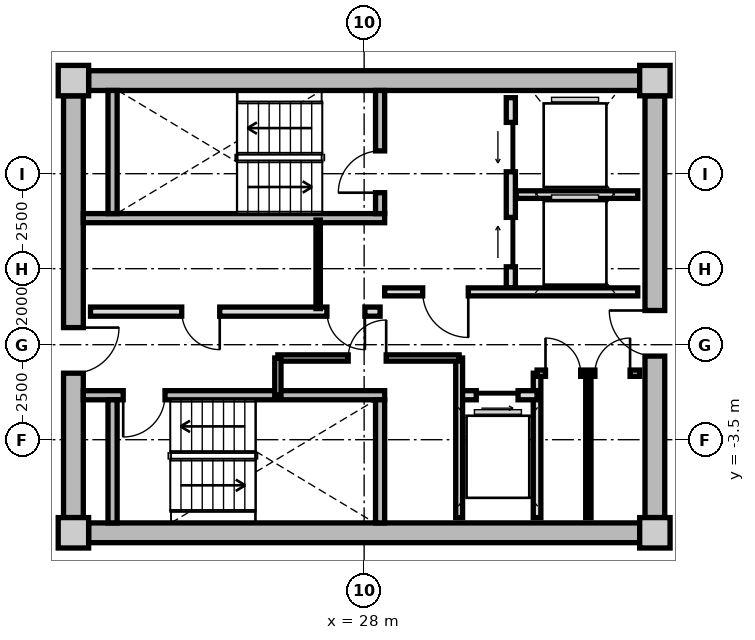
"""IFC4 building model, lengths in metres.
Left out: names, types, materials, properties, quantities, classifications, styles, units other than length and angle.
Written with IfcOpenShell. Run it as: python <this file> out.ifc"""

import sys

from ifc_helpers import new_model, si_unit, direction, frame, frame_2d, origin, origin_2d, place, context, subcontext, project, spatial, rectangle, extrude, source, transform, mapped, element, fill, save


model = new_model("IFC4")
c1 = context("Model", 3, precision=1e-05, world=origin(), true_north=direction((0.0, 1.0)))
c2 = subcontext(c1, "Body", "Model", "MODEL_VIEW")
j1 = project(units=[si_unit("LENGTHUNIT", "METRE"), si_unit("PLANEANGLEUNIT", "RADIAN")], contexts=[c1])
p1 = place(None, origin())
s1 = spatial("IfcSite", under=j1, at=p1, CompositionType="ELEMENT")
p2 = place(p1, origin())
s2 = spatial("IfcBuilding", under=s1, at=p2, CompositionType="ELEMENT")
p3 = place(p2, frame((0.0, 0.0, 223.05)))
s3 = spatial("IfcBuildingStorey", under=s2, at=p3, CompositionType="ELEMENT", Elevation=223.05)
m1 = source(origin(), c2, "Body", "SweptSolid", [
    extrude(rectangle(XDim=0.8, YDim=0.8, at=origin_2d()), origin(), (0.0, 0.0, 1.0), 3.05),
])
for number, where, z_axis, x_axis in (
    (1, (20.35, -5.95, 0.0), (0.0, 0.0, 1.0), (1.0, 0.0, 0.0)),
    (2, (35.65, -5.95, 0.0), (0.0, 0.0, 1.0), (1.0, 0.0, 0.0)),
    (3, (35.65, 5.95, 0.0), (0.0, 0.0, 1.0), (1.0, 0.0, 0.0)),
    (4, (20.35, 5.95, 0.0), (0.0, 0.0, 1.0), (1.0, 0.0, 0.0)),
):
    element("IfcColumn", number, at=place(p3, frame(where, z_axis=z_axis, x_axis=x_axis)), inside=s3, PredefinedType="COLUMN", context=c2, shape_type="MappedRepresentation", body=[
        mapped(m1, transform((0.0, 0.0, 0.0), x_axis=(1.0, 0.0, 0.0), y_axis=(0.0, 1.0, 0.0), z_axis=(0.0, 0.0, 1.0), scale=1.0)),
    ])
m2 = source(origin(), c2, "Body", "SweptSolid", [
    extrude(rectangle(XDim=14.5, YDim=0.52, at=frame_2d((7.25, 0.0))), origin(), (0.0, 0.0, 1.0), 2.76),
])
for number, where, z_axis, x_axis in (
    (5, (20.75, 5.95, 0.0), (0.0, 0.0, 1.0), (1.0, 0.0, 0.0)),
    (6, (35.25, -5.95, 0.0), (0.0, 0.0, 1.0), (-1.0, 0.0, 0.0)),
):
    element("IfcWall", number, at=place(p3, frame(where, z_axis=z_axis, x_axis=x_axis)), inside=s3, PredefinedType="SHEAR", context=c2, shape_type="MappedRepresentation", body=[
        mapped(m2, transform((0.0, 0.0, 0.0), x_axis=(1.0, 0.0, 0.0), y_axis=(0.0, 1.0, 0.0), z_axis=(0.0, 0.0, 1.0), scale=1.0)),
    ])
m3 = source(origin(), c2, "Body", "SweptSolid", [
    extrude(rectangle(XDim=11.1, YDim=0.52, at=frame_2d((5.55, 0.0))), origin(), (0.0, 0.0, 1.0), 2.76),
])
p4 = place(p3, frame((20.35, -5.55, 0.0), z_axis=(0.0, 0.0, 1.0), x_axis=(0.0, 1.0, 0.0)))
e7 = element("IfcWall", 7, at=p4, inside=s3, PredefinedType="SHEAR", context=c2, shape_type="MappedRepresentation", body=[
    mapped(m3, transform((0.0, 0.0, 0.0), x_axis=(1.0, 0.0, 0.0), y_axis=(0.0, 1.0, 0.0), z_axis=(0.0, 0.0, 1.0), scale=1.0)),
])
p5 = place(p4, frame((3.8, 0.0, 0.0)))
e8 = element("IfcOpeningElement", 8, at=p5, cuts=e7, PredefinedType="OPENING", context=c2, shape_type="SweptSolid", body=[
    extrude(rectangle(XDim=1.2, YDim=2.15, at=frame_2d((0.6, 1.075))), frame((0.0, 0.27, 0.0), z_axis=(0.0, -1.0, 0.0), x_axis=(1.0, 0.0, 0.0)), (0.0, 0.0, 1.0), 0.54),
])
p6 = place(p3, frame((35.65, 5.55, 0.0), z_axis=(0.0, 0.0, 1.0), x_axis=(0.0, -1.0, 0.0)))
e9 = element("IfcWall", 9, at=p6, inside=s3, PredefinedType="SHEAR", context=c2, shape_type="MappedRepresentation", body=[
    mapped(m3, transform((0.0, 0.0, 0.0), x_axis=(1.0, 0.0, 0.0), y_axis=(0.0, 1.0, 0.0), z_axis=(0.0, 0.0, 1.0), scale=1.0)),
])
p7 = place(p6, frame((5.65, 0.0, 0.0)))
e10 = element("IfcOpeningElement", 10, at=p7, cuts=e9, PredefinedType="OPENING", context=c2, shape_type="SweptSolid", body=[
    extrude(rectangle(XDim=1.2, YDim=2.15, at=frame_2d((0.6, 1.075))), frame((0.0, 0.27, 0.0), z_axis=(0.0, -1.0, 0.0), x_axis=(1.0, 0.0, 0.0)), (0.0, 0.0, 1.0), 0.54),
])
m4 = source(origin(), c2, "Body", "SweptSolid", [
    extrude(rectangle(XDim=7.93, YDim=0.24, at=frame_2d((3.965, 0.0))), origin(), (0.0, 0.0, 1.0), 2.76),
])
p8 = place(p3, frame((20.61, 2.33, 0.0), z_axis=(0.0, 0.0, 1.0), x_axis=(1.0, 0.0, 0.0)))
e11 = element("IfcWall", 11, at=p8, inside=s3, PredefinedType="PARTITIONING", context=c2, shape_type="MappedRepresentation", body=[
    mapped(m4, transform((0.0, 0.0, 0.0), x_axis=(1.0, 0.0, 0.0), y_axis=(0.0, 1.0, 0.0), z_axis=(0.0, 0.0, 1.0), scale=1.0)),
])
m5 = source(origin(), c2, "Body", "SweptSolid", [
    extrude(rectangle(XDim=3.24, YDim=0.24, at=frame_2d((1.62, 0.0))), origin(), (0.0, 0.0, 1.0), 2.76),
])
p9 = place(p3, frame((21.38, 2.45, 0.0), z_axis=(0.0, 0.0, 1.0), x_axis=(0.0, 1.0, 0.0)))
e12 = element("IfcWall", 12, at=p9, inside=s3, PredefinedType="PARTITIONING", context=c2, shape_type="MappedRepresentation", body=[
    mapped(m5, transform((0.0, 0.0, 0.0), x_axis=(1.0, 0.0, 0.0), y_axis=(0.0, 1.0, 0.0), z_axis=(0.0, 0.0, 1.0), scale=1.0)),
])
p10 = place(p3, frame((28.42, 2.45, 0.0), z_axis=(0.0, 0.0, 1.0), x_axis=(0.0, 1.0, 0.0)))
e13 = element("IfcWall", 13, at=p10, inside=s3, PredefinedType="PARTITIONING", context=c2, shape_type="MappedRepresentation", body=[
    mapped(m5, transform((0.0, 0.0, 0.0), x_axis=(1.0, 0.0, 0.0), y_axis=(0.0, 1.0, 0.0), z_axis=(0.0, 0.0, 1.0), scale=1.0)),
])
p11 = place(p10, frame((0.55, 0.0, 0.0)))
e14 = element("IfcOpeningElement", 14, at=p11, cuts=e13, PredefinedType="OPENING", context=c2, shape_type="SweptSolid", body=[
    extrude(rectangle(XDim=1.1, YDim=2.15, at=frame_2d((0.55, 1.075))), frame((0.0, 0.13, 0.0), z_axis=(0.0, -1.0, 0.0), x_axis=(1.0, 0.0, 0.0)), (0.0, 0.0, 1.0), 0.26),
])
p12 = place(p3, frame((20.61, -2.33, 0.0), z_axis=(0.0, 0.0, 1.0), x_axis=(1.0, 0.0, 0.0)))
e15 = element("IfcWall", 15, at=p12, inside=s3, PredefinedType="PARTITIONING", context=c2, shape_type="MappedRepresentation", body=[
    mapped(m4, transform((0.0, 0.0, 0.0), x_axis=(1.0, 0.0, 0.0), y_axis=(0.0, 1.0, 0.0), z_axis=(0.0, 0.0, 1.0), scale=1.0)),
])
p13 = place(p12, frame((1.05, 0.0, 0.0)))
e16 = element("IfcOpeningElement", 16, at=p13, cuts=e15, PredefinedType="OPENING", context=c2, shape_type="SweptSolid", body=[
    extrude(rectangle(XDim=1.1, YDim=2.15, at=frame_2d((0.55, 1.075))), frame((0.0, 0.13, 0.0), z_axis=(0.0, -1.0, 0.0), x_axis=(1.0, 0.0, 0.0)), (0.0, 0.0, 1.0), 0.26),
])
for number, where, z_axis, x_axis in (
    (17, (21.38, -5.69, 0.0), (0.0, 0.0, 1.0), (0.0, 1.0, 0.0)),
    (18, (28.42, -5.69, 0.0), (0.0, 0.0, 1.0), (0.0, 1.0, 0.0)),
):
    element("IfcWall", number, at=place(p3, frame(where, z_axis=z_axis, x_axis=x_axis)), inside=s3, PredefinedType="PARTITIONING", context=c2, shape_type="MappedRepresentation", body=[
        mapped(m5, transform((0.0, 0.0, 0.0), x_axis=(1.0, 0.0, 0.0), y_axis=(0.0, 1.0, 0.0), z_axis=(0.0, 0.0, 1.0), scale=1.0)),
    ])
m6 = source(origin(), c2, "Body", "SweptSolid", [
    extrude(rectangle(XDim=5.0, YDim=0.24, at=frame_2d((2.5, 0.0))), origin(), (0.0, 0.0, 1.0), 2.745),
])
p14 = place(p3, frame((31.86, 0.5, 0.0), z_axis=(0.0, 0.0, 1.0), x_axis=(0.0, 1.0, 0.0)))
e19 = element("IfcWall", 19, at=p14, inside=s3, PredefinedType="PARTITIONING", context=c2, shape_type="MappedRepresentation", body=[
    mapped(m6, transform((0.0, 0.0, 0.0), x_axis=(1.0, 0.0, 0.0), y_axis=(0.0, 1.0, 0.0), z_axis=(0.0, 0.0, 1.0), scale=1.0)),
])
p15 = place(p14, frame((3.05, 0.0, 0.0)))
e20 = element("IfcOpeningElement", 20, at=p15, cuts=e19, PredefinedType="OPENING", context=c2, shape_type="SweptSolid", body=[
    extrude(rectangle(XDim=1.3, YDim=2.2, at=frame_2d((0.65, 1.1))), frame((0.0, 0.13, 0.0), z_axis=(0.0, -1.0, 0.0), x_axis=(1.0, 0.0, 0.0)), (0.0, 0.0, 1.0), 0.26),
])
p16 = place(p14, frame((0.55, 0.0, 0.0)))
e21 = element("IfcOpeningElement", 21, at=p16, cuts=e19, PredefinedType="OPENING", context=c2, shape_type="SweptSolid", body=[
    extrude(rectangle(XDim=1.3, YDim=2.2, at=frame_2d((0.65, 1.1))), frame((0.0, 0.13, 0.0), z_axis=(0.0, -1.0, 0.0), x_axis=(1.0, 0.0, 0.0)), (0.0, 0.0, 1.0), 0.26),
])
m7 = source(origin(), c2, "Body", "SweptSolid", [
    extrude(rectangle(XDim=3.2, YDim=0.2, at=frame_2d((1.6, 0.0))), origin(), (0.0, 0.0, 1.0), 2.745),
])
p17 = place(p3, frame((32.0, 2.95, 0.0), z_axis=(0.0, 0.0, 1.0), x_axis=(1.0, 0.0, 0.0)))
e22 = element("IfcWall", 22, at=p17, inside=s3, PredefinedType="PARTITIONING", context=c2, shape_type="MappedRepresentation", body=[
    mapped(m7, transform((0.0, 0.0, 0.0), x_axis=(1.0, 0.0, 0.0), y_axis=(0.0, 1.0, 0.0), z_axis=(0.0, 0.0, 1.0), scale=1.0)),
])
m8 = source(origin(), c2, "Body", "SweptSolid", [
    extrude(rectangle(XDim=6.66, YDim=0.21, at=frame_2d((3.33, 0.0))), origin(), (0.0, 0.0, 1.0), 2.745),
])
p18 = place(p3, frame((28.54, 0.39, 0.0), z_axis=(0.0, 0.0, 1.0), x_axis=(1.0, 0.0, 0.0)))
e23 = element("IfcWall", 23, at=p18, inside=s3, PredefinedType="PARTITIONING", context=c2, shape_type="MappedRepresentation", body=[
    mapped(m8, transform((0.0, 0.0, 0.0), x_axis=(1.0, 0.0, 0.0), y_axis=(0.0, 1.0, 0.0), z_axis=(0.0, 0.0, 1.0), scale=1.0)),
])
p19 = place(p18, frame((1.0, 0.0, 0.0)))
e24 = element("IfcOpeningElement", 24, at=p19, cuts=e23, PredefinedType="OPENING", context=c2, shape_type="SweptSolid", body=[
    extrude(rectangle(XDim=1.2, YDim=2.15, at=frame_2d((0.6, 1.075))), frame((0.0, 0.115, 0.0), z_axis=(0.0, -1.0, 0.0), x_axis=(1.0, 0.0, 0.0)), (0.0, 0.0, 1.0), 0.23),
])
m9 = source(origin(), c2, "Body", "SweptSolid", [
    extrude(rectangle(XDim=7.62, YDim=0.24, at=frame_2d((3.81, 0.0))), origin(), (0.0, 0.0, 1.0), 2.745),
])
p20 = place(p3, frame((20.8, -0.13, 0.0), z_axis=(0.0, 0.0, 1.0), x_axis=(1.0, 0.0, 0.0)))
e25 = element("IfcWall", 25, at=p20, inside=s3, PredefinedType="PARTITIONING", context=c2, shape_type="MappedRepresentation", body=[
    mapped(m9, transform((0.0, 0.0, 0.0), x_axis=(1.0, 0.0, 0.0), y_axis=(0.0, 1.0, 0.0), z_axis=(0.0, 0.0, 1.0), scale=1.0)),
])
p21 = place(p20, frame((6.22, 0.0, 0.0)))
e26 = element("IfcOpeningElement", 26, at=p21, cuts=e25, PredefinedType="OPENING", context=c2, shape_type="SweptSolid", body=[
    extrude(rectangle(XDim=1.0, YDim=2.1, at=frame_2d((0.5, 1.05))), frame((0.0, 0.13, 0.0), z_axis=(0.0, -1.0, 0.0), x_axis=(1.0, 0.0, 0.0)), (0.0, 0.0, 1.0), 0.26),
])
p22 = place(p20, frame((2.4, 0.0, 0.0)))
e27 = element("IfcOpeningElement", 27, at=p22, cuts=e25, PredefinedType="OPENING", context=c2, shape_type="SweptSolid", body=[
    extrude(rectangle(XDim=1.0, YDim=2.1, at=frame_2d((0.5, 1.05))), frame((0.0, 0.13, 0.0), z_axis=(0.0, -1.0, 0.0), x_axis=(1.0, 0.0, 0.0)), (0.0, 0.0, 1.0), 0.26),
])
m10 = source(origin(), c2, "Body", "SweptSolid", [
    extrude(rectangle(XDim=2.33, YDim=0.115, at=frame_2d((1.165, 0.0))), origin(), (0.0, 0.0, 1.0), 2.745),
])
p23 = place(p3, frame((26.79, -0.05, 0.0), z_axis=(0.0, 0.0, 1.0), x_axis=(0.0, 1.0, 0.0)))
e28 = element("IfcWall", 28, at=p23, inside=s3, PredefinedType="PARTITIONING", context=c2, shape_type="MappedRepresentation", body=[
    mapped(m10, transform((0.0, 0.0, 0.0), x_axis=(1.0, 0.0, 0.0), y_axis=(0.0, 1.0, 0.0), z_axis=(0.0, 0.0, 1.0), scale=1.0)),
])
m11 = source(origin(), c2, "Body", "SweptSolid", [
    extrude(rectangle(XDim=3.8, YDim=0.2, at=frame_2d((1.9, 0.0))), origin(), (0.0, 0.0, 1.0), 2.745),
])
p24 = place(p3, frame((32.55, -5.55, 0.0), z_axis=(0.0, 0.0, 1.0), x_axis=(0.0, 1.0, 0.0)))
e29 = element("IfcWall", 29, at=p24, inside=s3, PredefinedType="PARTITIONING", context=c2, shape_type="MappedRepresentation", body=[
    mapped(m11, transform((0.0, 0.0, 0.0), x_axis=(1.0, 0.0, 0.0), y_axis=(0.0, 1.0, 0.0), z_axis=(0.0, 0.0, 1.0), scale=1.0)),
])
m12 = source(origin(), c2, "Body", "SweptSolid", [
    extrude(rectangle(XDim=2.05, YDim=0.24, at=frame_2d((1.025, 0.0))), origin(), (0.0, 0.0, 1.0), 2.745),
])
p25 = place(p3, frame((30.5, -2.33, 0.0), z_axis=(0.0, 0.0, 1.0), x_axis=(1.0, 0.0, 0.0)))
e30 = element("IfcWall", 30, at=p25, inside=s3, PredefinedType="PARTITIONING", context=c2, shape_type="MappedRepresentation", body=[
    mapped(m12, transform((0.0, 0.0, 0.0), x_axis=(1.0, 0.0, 0.0), y_axis=(0.0, 1.0, 0.0), z_axis=(0.0, 0.0, 1.0), scale=1.0)),
])
p26 = place(p25, frame((0.45, 0.0, 0.0)))
e31 = element("IfcOpeningElement", 31, at=p26, cuts=e30, PredefinedType="OPENING", context=c2, shape_type="SweptSolid", body=[
    extrude(rectangle(XDim=1.1, YDim=2.2, at=frame_2d((0.55, 1.1))), frame((0.0, 0.13, 0.0), z_axis=(0.0, -1.0, 0.0), x_axis=(1.0, 0.0, 0.0)), (0.0, 0.0, 1.0), 0.26),
])
m13 = source(origin(), c2, "Body", "SweptSolid", [
    extrude(rectangle(XDim=4.2, YDim=0.18, at=frame_2d((2.1, 0.0))), origin(), (0.0, 0.0, 1.0), 2.745),
])
p27 = place(p3, frame((30.5, -5.55, 0.0), z_axis=(0.0, 0.0, 1.0), x_axis=(0.0, 1.0, 0.0)))
e32 = element("IfcWall", 32, at=p27, inside=s3, PredefinedType="PARTITIONING", context=c2, shape_type="MappedRepresentation", body=[
    mapped(m13, transform((0.0, 0.0, 0.0), x_axis=(1.0, 0.0, 0.0), y_axis=(0.0, 1.0, 0.0), z_axis=(0.0, 0.0, 1.0), scale=1.0)),
])
m14 = source(origin(), c2, "Body", "SweptSolid", [
    extrude(rectangle(XDim=4.77, YDim=0.165, at=frame_2d((2.385, 0.0))), origin(), (0.0, 0.0, 1.0), 2.745),
])
p28 = place(p3, frame((25.73, -1.35, 0.0), z_axis=(0.0, 0.0, 1.0), x_axis=(1.0, 0.0, 0.0)))
e33 = element("IfcWall", 33, at=p28, inside=s3, PredefinedType="PARTITIONING", context=c2, shape_type="MappedRepresentation", body=[
    mapped(m14, transform((0.0, 0.0, 0.0), x_axis=(1.0, 0.0, 0.0), y_axis=(0.0, 1.0, 0.0), z_axis=(0.0, 0.0, 1.0), scale=1.0)),
])
p29 = place(p28, frame((1.85, 0.0, 0.0)))
e34 = element("IfcOpeningElement", 34, at=p29, cuts=e33, PredefinedType="OPENING", context=c2, shape_type="SweptSolid", body=[
    extrude(rectangle(XDim=1.0, YDim=2.1, at=frame_2d((0.5, 1.05))), frame((0.0, 0.093, 0.0), z_axis=(0.0, -1.0, 0.0), x_axis=(1.0, 0.0, 0.0)), (0.0, 0.0, 1.0), 0.185),
])
m15 = source(origin(), c2, "Body", "SweptSolid", [
    extrude(rectangle(XDim=0.98, YDim=0.165, at=frame_2d((0.49, 0.0))), origin(), (0.0, 0.0, 1.0), 2.745),
])
p30 = place(p3, frame((25.73, -2.33, 0.0), z_axis=(0.0, 0.0, 1.0), x_axis=(0.0, 1.0, 0.0)))
e35 = element("IfcWall", 35, at=p30, inside=s3, PredefinedType="PARTITIONING", context=c2, shape_type="MappedRepresentation", body=[
    mapped(m15, transform((0.0, 0.0, 0.0), x_axis=(1.0, 0.0, 0.0), y_axis=(0.0, 1.0, 0.0), z_axis=(0.0, 0.0, 1.0), scale=1.0)),
])
m16 = source(origin(), c2, "Body", "SweptSolid", [
    extrude(rectangle(XDim=2.7, YDim=0.165, at=frame_2d((1.35, 0.0))), origin(), (0.0, 0.0, 1.0), 2.745),
])
p31 = place(p3, frame((32.55, -1.75, 0.0), z_axis=(0.0, 0.0, 1.0), x_axis=(1.0, 0.0, 0.0)))
e36 = element("IfcWall", 36, at=p31, inside=s3, PredefinedType="PARTITIONING", context=c2, shape_type="MappedRepresentation", body=[
    mapped(m16, transform((0.0, 0.0, 0.0), x_axis=(1.0, 0.0, 0.0), y_axis=(0.0, 1.0, 0.0), z_axis=(0.0, 0.0, 1.0), scale=1.0)),
])
p32 = place(p31, frame((0.222, 0.0, 0.0)))
e37 = element("IfcOpeningElement", 37, at=p32, cuts=e36, PredefinedType="OPENING", context=c2, shape_type="SweptSolid", body=[
    extrude(rectangle(XDim=0.925, YDim=2.1, at=frame_2d((0.462, 1.05))), frame((0.0, 0.093, 0.0), z_axis=(0.0, -1.0, 0.0), x_axis=(1.0, 0.0, 0.0)), (0.0, 0.0, 1.0), 0.185),
])
p33 = place(p31, frame((1.522, 0.0, 0.0)))
e38 = element("IfcOpeningElement", 38, at=p33, cuts=e36, PredefinedType="OPENING", context=c2, shape_type="SweptSolid", body=[
    extrude(rectangle(XDim=0.925, YDim=2.1, at=frame_2d((0.462, 1.05))), frame((0.0, 0.093, 0.0), z_axis=(0.0, -1.0, 0.0), x_axis=(1.0, 0.0, 0.0)), (0.0, 0.0, 1.0), 0.185),
])
m17 = source(origin(), c2, "Body", "SweptSolid", [
    extrude(rectangle(XDim=3.8, YDim=0.14, at=frame_2d((1.9, 0.0))), origin(), (0.0, 0.0, 1.0), 2.745),
])
p34 = place(p3, frame((33.9, -5.55, 0.0), z_axis=(0.0, 0.0, 1.0), x_axis=(0.0, 1.0, 0.0)))
e39 = element("IfcWall", 39, at=p34, inside=s3, PredefinedType="PARTITIONING", context=c2, shape_type="MappedRepresentation", body=[
    mapped(m17, transform((0.0, 0.0, 0.0), x_axis=(1.0, 0.0, 0.0), y_axis=(0.0, 1.0, 0.0), z_axis=(0.0, 0.0, 1.0), scale=1.0)),
])
m18 = source(origin(), c2, "Body", "SweptSolid", [
    extrude(rectangle(XDim=1.1, YDim=2.15, at=frame_2d((0.55, 1.075))), frame((0.0, 0.025, 0.0), z_axis=(0.0, -1.0, 0.0), x_axis=(1.0, 0.0, 0.0)), (0.0, 0.0, 1.0), 0.05),
])
p35 = place(p11, origin())
e40 = element("IfcDoor", 40, at=p35, inside=s3, OperationType="SINGLE_SWING_LEFT", PredefinedType="DOOR", context=c2, shape_type="MappedRepresentation", body=[
    mapped(m18, transform((0.0, 0.0, 0.0), x_axis=(1.0, 0.0, 0.0), y_axis=(0.0, 1.0, 0.0), z_axis=(0.0, 0.0, 1.0), scale=1.0)),
])
fill(e14, e40)
p36 = place(p13, frame((1.1, 0.0, 0.0), z_axis=(0.0, 0.0, 1.0), x_axis=(-1.0, 0.0, 0.0)))
e41 = element("IfcDoor", 41, at=p36, inside=s3, OperationType="SINGLE_SWING_RIGHT", PredefinedType="DOOR", context=c2, shape_type="MappedRepresentation", body=[
    mapped(m18, transform((0.0, 0.0, 0.0), x_axis=(1.0, 0.0, 0.0), y_axis=(0.0, 1.0, 0.0), z_axis=(0.0, 0.0, 1.0), scale=1.0)),
])
fill(e16, e41)
m19 = source(origin(), c2, "Body", "SweptSolid", [
    extrude(rectangle(XDim=1.3, YDim=2.2, at=frame_2d((0.65, 1.1))), frame((0.0, 0.025, 0.0), z_axis=(0.0, -1.0, 0.0), x_axis=(1.0, 0.0, 0.0)), (0.0, 0.0, 1.0), 0.05),
])
p37 = place(p15, origin())
e42 = element("IfcDoor", 42, at=p37, inside=s3, OperationType="SLIDING_TO_LEFT", PredefinedType="DOOR", context=c2, shape_type="MappedRepresentation", body=[
    mapped(m19, transform((0.0, 0.0, 0.0), x_axis=(1.0, 0.0, 0.0), y_axis=(0.0, 1.0, 0.0), z_axis=(0.0, 0.0, 1.0), scale=1.0)),
])
fill(e20, e42)
p38 = place(p16, origin())
e43 = element("IfcDoor", 43, at=p38, inside=s3, OperationType="SLIDING_TO_RIGHT", PredefinedType="DOOR", context=c2, shape_type="MappedRepresentation", body=[
    mapped(m19, transform((0.0, 0.0, 0.0), x_axis=(1.0, 0.0, 0.0), y_axis=(0.0, 1.0, 0.0), z_axis=(0.0, 0.0, 1.0), scale=1.0)),
])
fill(e21, e43)
m20 = source(origin(), c2, "Body", "SweptSolid", [
    extrude(rectangle(XDim=1.2, YDim=2.15, at=frame_2d((0.6, 1.075))), frame((0.0, 0.025, 0.0), z_axis=(0.0, -1.0, 0.0), x_axis=(1.0, 0.0, 0.0)), (0.0, 0.0, 1.0), 0.05),
])
p39 = place(p19, frame((1.2, 0.0, 0.0), z_axis=(0.0, 0.0, 1.0), x_axis=(-1.0, 0.0, 0.0)))
e44 = element("IfcDoor", 44, at=p39, inside=s3, OperationType="SINGLE_SWING_LEFT", PredefinedType="DOOR", context=c2, shape_type="MappedRepresentation", body=[
    mapped(m20, transform((0.0, 0.0, 0.0), x_axis=(1.0, 0.0, 0.0), y_axis=(0.0, 1.0, 0.0), z_axis=(0.0, 0.0, 1.0), scale=1.0)),
])
fill(e24, e44)
p40 = place(p5, frame((1.2, 0.0, 0.0), z_axis=(0.0, 0.0, 1.0), x_axis=(-1.0, 0.0, 0.0)))
e45 = element("IfcDoor", 45, at=p40, inside=s3, OperationType="SINGLE_SWING_LEFT", PredefinedType="DOOR", context=c2, shape_type="MappedRepresentation", body=[
    mapped(m20, transform((0.0, 0.0, 0.0), x_axis=(1.0, 0.0, 0.0), y_axis=(0.0, 1.0, 0.0), z_axis=(0.0, 0.0, 1.0), scale=1.0)),
])
fill(e8, e45)
p41 = place(p7, frame((1.2, 0.0, 0.0), z_axis=(0.0, 0.0, 1.0), x_axis=(-1.0, 0.0, 0.0)))
e46 = element("IfcDoor", 46, at=p41, inside=s3, OperationType="SINGLE_SWING_RIGHT", PredefinedType="DOOR", context=c2, shape_type="MappedRepresentation", body=[
    mapped(m20, transform((0.0, 0.0, 0.0), x_axis=(1.0, 0.0, 0.0), y_axis=(0.0, 1.0, 0.0), z_axis=(0.0, 0.0, 1.0), scale=1.0)),
])
fill(e10, e46)
m21 = source(origin(), c2, "Body", "SweptSolid", [
    extrude(rectangle(XDim=1.0, YDim=2.1, at=frame_2d((0.5, 1.05))), frame((0.0, 0.025, 0.0), z_axis=(0.0, -1.0, 0.0), x_axis=(1.0, 0.0, 0.0)), (0.0, 0.0, 1.0), 0.05),
])
p42 = place(p21, frame((1.0, 0.0, 0.0), z_axis=(0.0, 0.0, 1.0), x_axis=(-1.0, 0.0, 0.0)))
e47 = element("IfcDoor", 47, at=p42, inside=s3, OperationType="SINGLE_SWING_LEFT", PredefinedType="DOOR", context=c2, shape_type="MappedRepresentation", body=[
    mapped(m21, transform((0.0, 0.0, 0.0), x_axis=(1.0, 0.0, 0.0), y_axis=(0.0, 1.0, 0.0), z_axis=(0.0, 0.0, 1.0), scale=1.0)),
])
fill(e26, e47)
p43 = place(p22, frame((1.0, 0.0, 0.0), z_axis=(0.0, 0.0, 1.0), x_axis=(-1.0, 0.0, 0.0)))
e48 = element("IfcDoor", 48, at=p43, inside=s3, OperationType="SINGLE_SWING_LEFT", PredefinedType="DOOR", context=c2, shape_type="MappedRepresentation", body=[
    mapped(m21, transform((0.0, 0.0, 0.0), x_axis=(1.0, 0.0, 0.0), y_axis=(0.0, 1.0, 0.0), z_axis=(0.0, 0.0, 1.0), scale=1.0)),
])
fill(e27, e48)
m22 = source(origin(), c2, "Body", "SweptSolid", [
    extrude(rectangle(XDim=1.1, YDim=2.2, at=frame_2d((0.55, 1.1))), frame((0.0, 0.025, 0.0), z_axis=(0.0, -1.0, 0.0), x_axis=(1.0, 0.0, 0.0)), (0.0, 0.0, 1.0), 0.05),
])
p44 = place(p26, frame((1.1, 0.0, 0.0), z_axis=(0.0, 0.0, 1.0), x_axis=(-1.0, 0.0, 0.0)))
e49 = element("IfcDoor", 49, at=p44, inside=s3, OperationType="SLIDING_TO_RIGHT", PredefinedType="DOOR", context=c2, shape_type="MappedRepresentation", body=[
    mapped(m22, transform((0.0, 0.0, 0.0), x_axis=(1.0, 0.0, 0.0), y_axis=(0.0, 1.0, 0.0), z_axis=(0.0, 0.0, 1.0), scale=1.0)),
])
fill(e31, e49)
p45 = place(p29, origin())
e50 = element("IfcDoor", 50, at=p45, inside=s3, OperationType="SINGLE_SWING_RIGHT", PredefinedType="DOOR", context=c2, shape_type="MappedRepresentation", body=[
    mapped(m21, transform((0.0, 0.0, 0.0), x_axis=(1.0, 0.0, 0.0), y_axis=(0.0, 1.0, 0.0), z_axis=(0.0, 0.0, 1.0), scale=1.0)),
])
fill(e34, e50)
m23 = source(origin(), c2, "Body", "SweptSolid", [
    extrude(rectangle(XDim=0.925, YDim=2.1, at=frame_2d((0.462, 1.05))), frame((0.0, 0.025, 0.0), z_axis=(0.0, -1.0, 0.0), x_axis=(1.0, 0.0, 0.0)), (0.0, 0.0, 1.0), 0.05),
])
p46 = place(p32, origin())
e51 = element("IfcDoor", 51, at=p46, inside=s3, OperationType="SINGLE_SWING_LEFT", PredefinedType="DOOR", context=c2, shape_type="MappedRepresentation", body=[
    mapped(m23, transform((0.0, 0.0, 0.0), x_axis=(1.0, 0.0, 0.0), y_axis=(0.0, 1.0, 0.0), z_axis=(0.0, 0.0, 1.0), scale=1.0)),
])
fill(e37, e51)
p47 = place(p33, origin())
e52 = element("IfcDoor", 52, at=p47, inside=s3, OperationType="SINGLE_SWING_RIGHT", PredefinedType="DOOR", context=c2, shape_type="MappedRepresentation", body=[
    mapped(m23, transform((0.0, 0.0, 0.0), x_axis=(1.0, 0.0, 0.0), y_axis=(0.0, 1.0, 0.0), z_axis=(0.0, 0.0, 1.0), scale=1.0)),
])
fill(e38, e52)
save(model, sys.argv[1])
